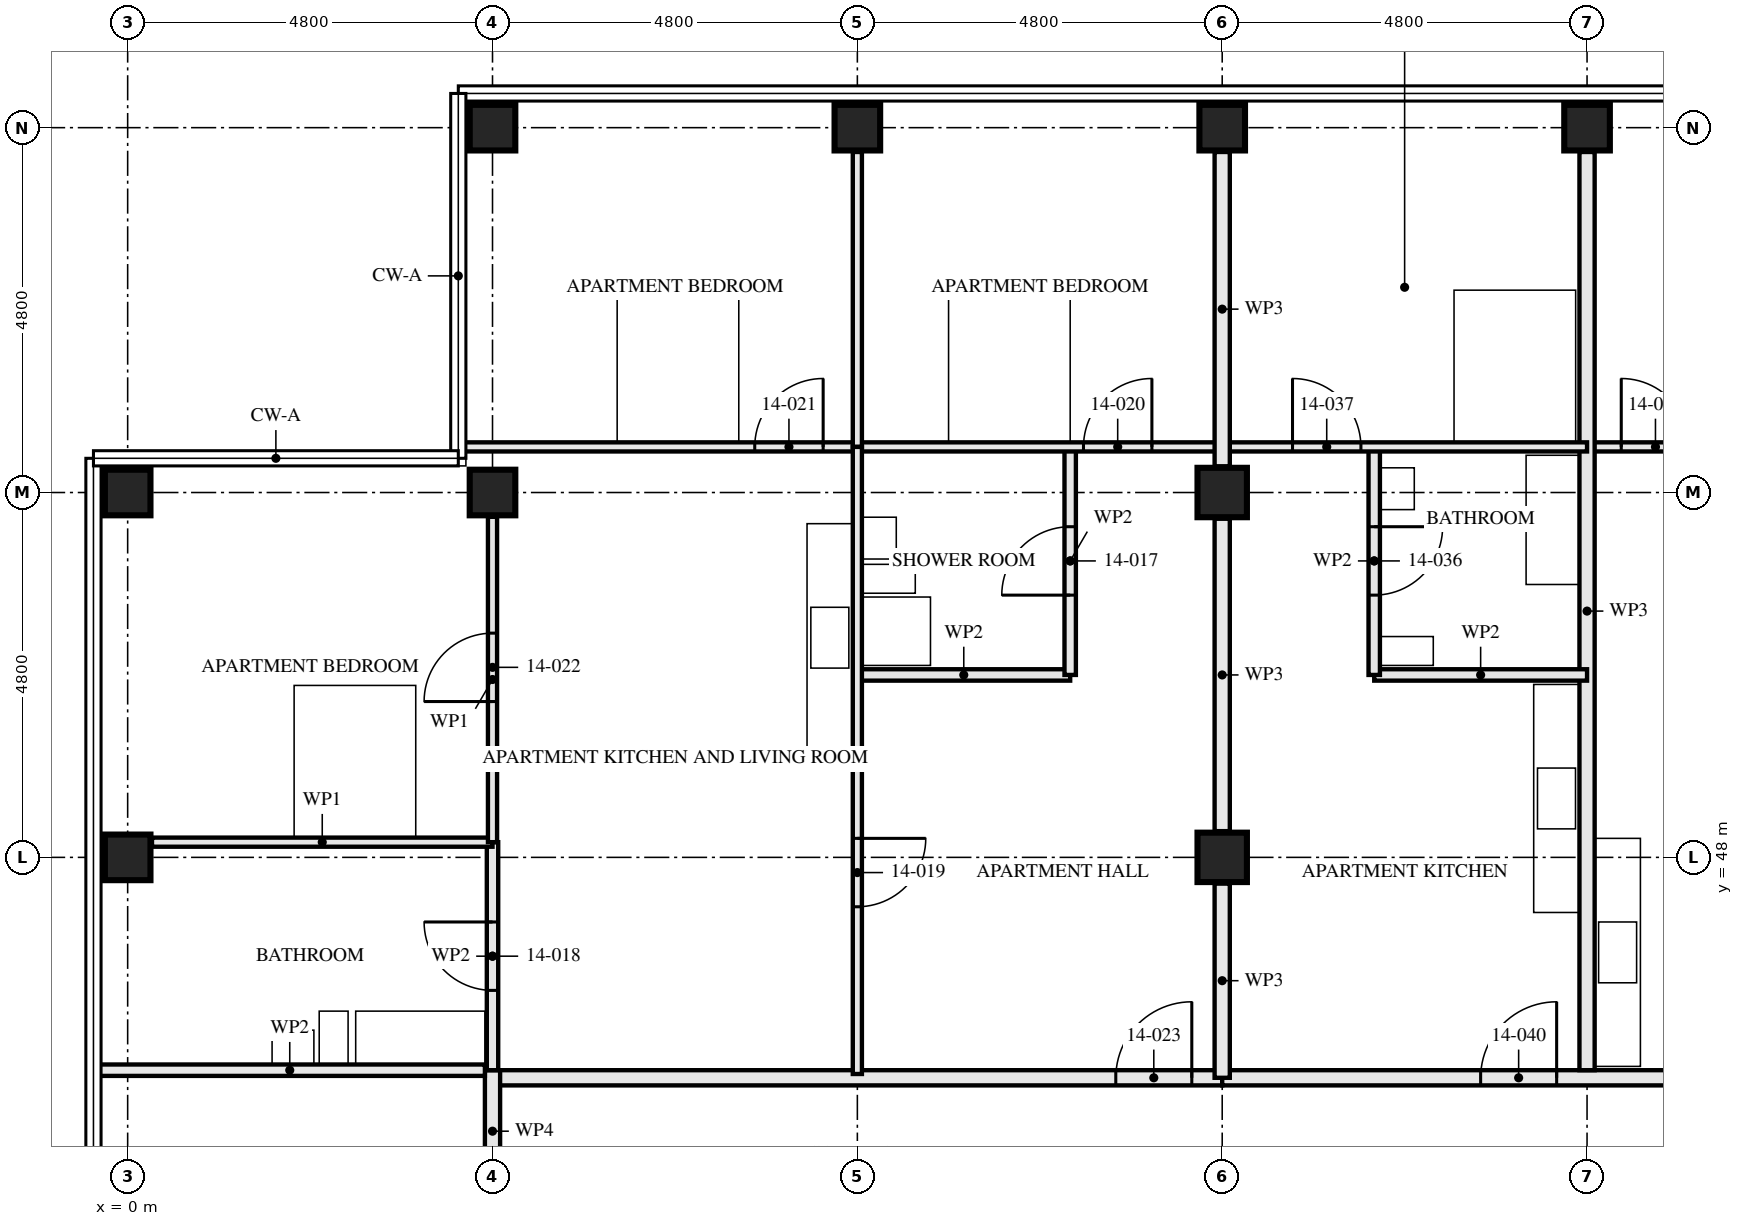
"""IFC4 building model, lengths in metres.
Left out: names, types, materials, properties, quantities, classifications, styles, units other than length and angle.
Written with IfcOpenShell. Run it as: python <this file> out.ifc"""

import sys

from ifc_helpers import new_model, si_unit, direction, frame, frame_2d, origin, origin_2d, place, context, subcontext, project, spatial, rectangle, hollow_rectangle, extrude, element, fill, save


model = new_model("IFC4")
c1 = context("Model", 3, precision=1e-05, world=origin(), true_north=direction((0.0, 1.0)))
c2 = subcontext(c1, "Body", "Model", "MODEL_VIEW")
j1 = project(units=[si_unit("LENGTHUNIT", "METRE"), si_unit("PLANEANGLEUNIT", "RADIAN")], contexts=[c1])
p1 = place(None, origin())
s1 = spatial("IfcSite", under=j1, at=p1, CompositionType="ELEMENT")
p2 = place(p1, origin())
s2 = spatial("IfcBuilding", under=s1, at=p2, CompositionType="ELEMENT")
p3 = place(p2, frame((0.0, 0.0, 55.0)))
s3 = spatial("IfcBuildingStorey", under=s2, at=p3, CompositionType="ELEMENT", Elevation=55.0)
p4 = place(p3, frame((0.0, 48.0, 0.0), z_axis=(0.0, 0.0, 1.0), x_axis=(1.0, 0.0, 0.0)))
e1 = element("IfcColumn", 1, at=p4, inside=s3, PredefinedType="COLUMN", context=c2, shape_type="SweptSolid", body=[
    extrude(hollow_rectangle(XDim=0.6, YDim=0.6, WallThickness=0.08, at=origin_2d()), origin(), (0.0, 0.0, 1.0), 3.5),
])
for number, where, z_axis, x_axis in (
    (2, (0.0, 52.8, 0.0), (0.0, 0.0, 1.0), (0.0, 1.0, 0.0)),
    (3, (4.8, 52.8, 0.0), (0.0, 0.0, 1.0), (0.0, 1.0, 0.0)),
    (4, (4.8, 57.6, 0.0), (0.0, 0.0, 1.0), (0.0, 1.0, 0.0)),
):
    element("IfcColumn", number, at=place(p3, frame(where, z_axis=z_axis, x_axis=x_axis)), inside=s3, PredefinedType="COLUMN", context=c2, shape_type="SweptSolid", body=[
        extrude(hollow_rectangle(XDim=0.6, YDim=0.6, WallThickness=0.06, at=origin_2d()), origin(), (0.0, 0.0, 1.0), 3.5),
    ])
p5 = place(p3, frame((9.6, 57.6, 0.0), z_axis=(0.0, 0.0, 1.0), x_axis=(0.0, 1.0, 0.0)))
e5 = element("IfcColumn", 5, at=p5, inside=s3, PredefinedType="COLUMN", context=c2, shape_type="SweptSolid", body=[
    extrude(hollow_rectangle(XDim=0.6, YDim=0.6, WallThickness=0.08, at=origin_2d()), origin(), (0.0, 0.0, 1.0), 3.5),
])
for number, where, z_axis, x_axis in (
    (6, (14.4, 48.0, 0.0), (0.0, 0.0, 1.0), (1.0, 0.0, 0.0)),
    (7, (14.4, 52.8, 0.0), (0.0, 0.0, 1.0), (1.0, 0.0, 0.0)),
):
    element("IfcColumn", number, at=place(p3, frame(where, z_axis=z_axis, x_axis=x_axis)), inside=s3, PredefinedType="COLUMN", context=c2, shape_type="SweptSolid", body=[
        extrude(hollow_rectangle(XDim=0.65, YDim=0.65, WallThickness=0.05, at=origin_2d()), origin(), (0.0, 0.0, 1.0), 3.5),
    ])
for number, where, z_axis, x_axis in (
    (8, (14.4, 57.6, 0.0), (0.0, 0.0, 1.0), (0.0, 1.0, 0.0)),
    (9, (19.2, 57.6, 0.0), (0.0, 0.0, 1.0), (0.0, 1.0, 0.0)),
):
    element("IfcColumn", number, at=place(p3, frame(where, z_axis=z_axis, x_axis=x_axis)), inside=s3, PredefinedType="COLUMN", context=c2, shape_type="SweptSolid", body=[
        extrude(hollow_rectangle(XDim=0.6, YDim=0.6, WallThickness=0.08, at=origin_2d()), origin(), (0.0, 0.0, 1.0), 3.5),
    ])
p6 = place(p3, frame((12.4, 53.4, 0.0), z_axis=(0.0, 0.0, 1.0), x_axis=(0.0, -1.0, 0.0)))
e10 = element("IfcWall", 10, at=p6, inside=s3, PredefinedType="PARTITIONING", context=c2, shape_type="SweptSolid", body=[
    extrude(rectangle(XDim=3.0, YDim=0.15, at=frame_2d((1.5, 0.0))), origin(), (0.0, 0.0, 1.0), 2.55),
])
p7 = place(p6, frame((1.05, 0.0, 0.0)))
e11 = element("IfcOpeningElement", 11, at=p7, cuts=e10, PredefinedType="OPENING", context=c2, shape_type="SweptSolid", body=[
    extrude(rectangle(XDim=0.9, YDim=2.1, at=frame_2d((0.45, 1.05))), frame((0.0, 0.085, 0.0), z_axis=(0.0, -1.0, 0.0), x_axis=(1.0, 0.0, 0.0)), (0.0, 0.0, 1.0), 0.171),
])
p8 = place(p3, frame((12.4, 50.4, 0.0), z_axis=(0.0, 0.0, 1.0), x_axis=(-1.0, 0.0, 0.0)))
e12 = element("IfcWall", 12, at=p8, inside=s3, PredefinedType="PARTITIONING", context=c2, shape_type="SweptSolid", body=[
    extrude(rectangle(XDim=2.8, YDim=0.15, at=frame_2d((1.4, 0.0))), origin(), (0.0, 0.0, 1.0), 3.33),
])
p9 = place(p3, frame((4.8, 48.2, 0.0), z_axis=(0.0, 0.0, 1.0), x_axis=(0.0, -1.0, 0.0)))
e13 = element("IfcWall", 13, at=p9, inside=s3, PredefinedType="PARTITIONING", context=c2, shape_type="SweptSolid", body=[
    extrude(rectangle(XDim=3.0, YDim=0.15, at=frame_2d((1.5, 0.0))), origin(), (0.0, 0.0, 1.0), 2.55),
])
p10 = place(p9, frame((1.05, 0.0, 0.0)))
e14 = element("IfcOpeningElement", 14, at=p10, cuts=e13, PredefinedType="OPENING", context=c2, shape_type="SweptSolid", body=[
    extrude(rectangle(XDim=0.9, YDim=2.1, at=frame_2d((0.45, 1.05))), frame((0.0, 0.085, 0.0), z_axis=(0.0, -1.0, 0.0), x_axis=(1.0, 0.0, 0.0)), (0.0, 0.0, 1.0), 0.171),
])
p11 = place(p3, frame((9.6, 53.4, 0.0), z_axis=(0.0, 0.0, 1.0), x_axis=(0.0, -1.0, 0.0)))
e15 = element("IfcWall", 15, at=p11, inside=s3, PredefinedType="PARTITIONING", context=c2, shape_type="SweptSolid", body=[
    extrude(rectangle(XDim=8.25, YDim=0.12, at=frame_2d((4.125, 0.0))), origin(), (0.0, 0.0, 1.0), 2.55),
])
p12 = place(p11, frame((5.15, 0.0, 0.0)))
e16 = element("IfcOpeningElement", 16, at=p12, cuts=e15, PredefinedType="OPENING", context=c2, shape_type="SweptSolid", body=[
    extrude(rectangle(XDim=0.9, YDim=2.1, at=frame_2d((0.45, 1.05))), frame((0.0, 0.071, 0.0), z_axis=(0.0, -1.0, 0.0), x_axis=(1.0, 0.0, 0.0)), (0.0, 0.0, 1.0), 0.141),
])
p13 = place(p3, frame((14.4, 53.4, 0.0), z_axis=(0.0, 0.0, 1.0), x_axis=(-1.0, 0.0, 0.0)))
e17 = element("IfcWall", 17, at=p13, inside=s3, PredefinedType="PARTITIONING", context=c2, shape_type="SweptSolid", body=[
    extrude(rectangle(XDim=4.8, YDim=0.12, at=frame_2d((2.4, 0.0))), origin(), (0.0, 0.0, 1.0), 3.33),
])
p14 = place(p13, frame((0.925, 0.0, 0.0)))
e18 = element("IfcOpeningElement", 18, at=p14, cuts=e17, PredefinedType="OPENING", context=c2, shape_type="SweptSolid", body=[
    extrude(rectangle(XDim=0.9, YDim=2.1, at=frame_2d((0.45, 1.05))), frame((0.0, 0.071, 0.0), z_axis=(0.0, -1.0, 0.0), x_axis=(1.0, 0.0, 0.0)), (0.0, 0.0, 1.0), 0.141),
])
p15 = place(p3, frame((9.6, 53.4, 0.0), z_axis=(0.0, 0.0, 1.0), x_axis=(-1.0, 0.0, 0.0)))
e19 = element("IfcWall", 19, at=p15, inside=s3, PredefinedType="PARTITIONING", context=c2, shape_type="SweptSolid", body=[
    extrude(rectangle(XDim=5.235, YDim=0.12, at=frame_2d((2.618, 0.0))), origin(), (0.0, 0.0, 1.0), 2.32),
])
p16 = place(p15, frame((0.45, 0.0, 0.0)))
e20 = element("IfcOpeningElement", 20, at=p16, cuts=e19, PredefinedType="OPENING", context=c2, shape_type="SweptSolid", body=[
    extrude(rectangle(XDim=0.9, YDim=2.1, at=frame_2d((0.45, 1.05))), frame((0.0, 0.071, 0.0), z_axis=(0.0, -1.0, 0.0), x_axis=(1.0, 0.0, 0.0)), (0.0, 0.0, 1.0), 0.141),
])
p17 = place(p3, frame((4.8, 48.2, 0.0), z_axis=(0.0, 0.0, 1.0), x_axis=(-1.0, 0.0, 0.0)))
e21 = element("IfcWall", 21, at=p17, inside=s3, PredefinedType="PARTITIONING", context=c2, shape_type="SweptSolid", body=[
    extrude(rectangle(XDim=4.48, YDim=0.12, at=frame_2d((2.24, 0.0))), origin(), (0.0, 0.0, 1.0), 3.33),
])
p18 = place(p3, frame((9.6, 57.28, 0.0), z_axis=(0.0, 0.0, 1.0), x_axis=(0.0, -1.0, 0.0)))
e22 = element("IfcWall", 22, at=p18, inside=s3, PredefinedType="PARTITIONING", context=c2, shape_type="SweptSolid", body=[
    extrude(rectangle(XDim=3.88, YDim=0.12, at=frame_2d((1.94, 0.0))), origin(), (0.0, 0.0, 1.0), 3.33),
])
p19 = place(p3, frame((4.8, 52.48, 0.0), z_axis=(0.0, 0.0, 1.0), x_axis=(0.0, -1.0, 0.0)))
e23 = element("IfcWall", 23, at=p19, inside=s3, PredefinedType="PARTITIONING", context=c2, shape_type="SweptSolid", body=[
    extrude(rectangle(XDim=4.28, YDim=0.12, at=frame_2d((2.14, 0.0))), origin(), (0.0, 0.0, 1.0), 3.33),
])
p20 = place(p19, frame((1.53, 0.0, 0.0)))
e24 = element("IfcOpeningElement", 24, at=p20, cuts=e23, PredefinedType="OPENING", context=c2, shape_type="SweptSolid", body=[
    extrude(rectangle(XDim=0.9, YDim=2.1, at=frame_2d((0.45, 1.05))), frame((0.0, 0.071, 0.0), z_axis=(0.0, -1.0, 0.0), x_axis=(1.0, 0.0, 0.0)), (0.0, 0.0, 1.0), 0.141),
])
p21 = place(p3, frame((14.4, 45.1, 0.0), z_axis=(0.0, 0.0, 1.0), x_axis=(-1.0, 0.0, 0.0)))
e25 = element("IfcWall", 25, at=p21, inside=s3, PredefinedType="PARTITIONING", context=c2, shape_type="SweptSolid", body=[
    extrude(rectangle(XDim=9.6, YDim=0.2, at=frame_2d((4.8, 0.0))), origin(), (0.0, 0.0, 1.0), 3.33),
])
p22 = place(p21, frame((0.4, 0.0, 0.0)))
e26 = element("IfcOpeningElement", 26, at=p22, cuts=e25, PredefinedType="OPENING", context=c2, shape_type="SweptSolid", body=[
    extrude(rectangle(XDim=1.0, YDim=2.1, at=frame_2d((0.5, 1.05))), frame((0.0, 0.111, 0.0), z_axis=(0.0, -1.0, 0.0), x_axis=(1.0, 0.0, 0.0)), (0.0, 0.0, 1.0), 0.221),
])
p23 = place(p3, frame((4.8, 45.2, 0.0), z_axis=(0.0, 0.0, 1.0), x_axis=(0.0, -1.0, 0.0)))
e27 = element("IfcWall", 27, at=p23, inside=s3, PredefinedType="PARTITIONING", context=c2, shape_type="SweptSolid", body=[
    extrude(rectangle(XDim=1.605, YDim=0.2, at=frame_2d((0.802, 0.0))), origin(), (0.0, 0.0, 1.0), 3.33),
])
p24 = place(p3, frame((24.0, 53.4, 0.0), z_axis=(0.0, 0.0, 1.0), x_axis=(-1.0, 0.0, 0.0)))
e28 = element("IfcWall", 28, at=p24, inside=s3, PredefinedType="PARTITIONING", context=c2, shape_type="SweptSolid", body=[
    extrude(rectangle(XDim=4.8, YDim=0.12, at=frame_2d((2.4, 0.0))), origin(), (0.0, 0.0, 1.0), 3.33),
])
p25 = place(p24, frame((3.45, 0.0, 0.0)))
e29 = element("IfcOpeningElement", 29, at=p25, cuts=e28, PredefinedType="OPENING", context=c2, shape_type="SweptSolid", body=[
    extrude(rectangle(XDim=0.9, YDim=2.1, at=frame_2d((0.45, 1.05))), frame((0.0, 0.071, 0.0), z_axis=(0.0, -1.0, 0.0), x_axis=(1.0, 0.0, 0.0)), (0.0, 0.0, 1.0), 0.141),
])
p26 = place(p3, frame((19.2, 57.28, 0.0), z_axis=(0.0, 0.0, 1.0), x_axis=(0.0, -1.0, 0.0)))
e30 = element("IfcWall", 30, at=p26, inside=s3, PredefinedType="PARTITIONING", context=c2, shape_type="SweptSolid", body=[
    extrude(rectangle(XDim=12.08, YDim=0.2, at=frame_2d((6.04, 0.0))), origin(), (0.0, 0.0, 1.0), 2.55),
])
p27 = place(p3, frame((16.4, 53.4, 0.0), z_axis=(0.0, 0.0, 1.0), x_axis=(0.0, -1.0, 0.0)))
e31 = element("IfcWall", 31, at=p27, inside=s3, PredefinedType="PARTITIONING", context=c2, shape_type="SweptSolid", body=[
    extrude(rectangle(XDim=3.0, YDim=0.15, at=frame_2d((1.5, 0.0))), origin(), (0.0, 0.0, 1.0), 2.55),
])
p28 = place(p27, frame((1.05, 0.0, 0.0)))
e32 = element("IfcOpeningElement", 32, at=p28, cuts=e31, PredefinedType="OPENING", context=c2, shape_type="SweptSolid", body=[
    extrude(rectangle(XDim=0.9, YDim=2.1, at=frame_2d((0.45, 1.05))), frame((0.0, 0.085, 0.0), z_axis=(0.0, -1.0, 0.0), x_axis=(1.0, 0.0, 0.0)), (0.0, 0.0, 1.0), 0.171),
])
p29 = place(p3, frame((19.2, 50.4, 0.0), z_axis=(0.0, 0.0, 1.0), x_axis=(-1.0, 0.0, 0.0)))
e33 = element("IfcWall", 33, at=p29, inside=s3, PredefinedType="PARTITIONING", context=c2, shape_type="SweptSolid", body=[
    extrude(rectangle(XDim=2.8, YDim=0.15, at=frame_2d((1.4, 0.0))), origin(), (0.0, 0.0, 1.0), 3.33),
])
p30 = place(p3, frame((19.2, 53.4, 0.0), z_axis=(0.0, 0.0, 1.0), x_axis=(-1.0, 0.0, 0.0)))
e34 = element("IfcWall", 34, at=p30, inside=s3, PredefinedType="PARTITIONING", context=c2, shape_type="SweptSolid", body=[
    extrude(rectangle(XDim=4.8, YDim=0.12, at=frame_2d((2.4, 0.0))), origin(), (0.0, 0.0, 1.0), 3.33),
])
p31 = place(p30, frame((2.975, 0.0, 0.0)))
e35 = element("IfcOpeningElement", 35, at=p31, cuts=e34, PredefinedType="OPENING", context=c2, shape_type="SweptSolid", body=[
    extrude(rectangle(XDim=0.9, YDim=2.1, at=frame_2d((0.45, 1.05))), frame((0.0, 0.071, 0.0), z_axis=(0.0, -1.0, 0.0), x_axis=(1.0, 0.0, 0.0)), (0.0, 0.0, 1.0), 0.141),
])
p32 = place(p3, frame((28.8, 45.1, 0.0), z_axis=(0.0, 0.0, 1.0), x_axis=(-1.0, 0.0, 0.0)))
e36 = element("IfcWall", 36, at=p32, inside=s3, PredefinedType="PARTITIONING", context=c2, shape_type="SweptSolid", body=[
    extrude(rectangle(XDim=14.4, YDim=0.2, at=frame_2d((7.2, 0.0))), origin(), (0.0, 0.0, 1.0), 3.33),
])
p33 = place(p32, frame((0.4, 0.0, 0.0)))
e37 = element("IfcOpeningElement", 37, at=p33, cuts=e36, PredefinedType="OPENING", context=c2, shape_type="SweptSolid", body=[
    extrude(rectangle(XDim=1.0, YDim=2.1, at=frame_2d((0.5, 1.05))), frame((0.0, 0.111, 0.0), z_axis=(0.0, -1.0, 0.0), x_axis=(1.0, 0.0, 0.0)), (0.0, 0.0, 1.0), 0.221),
])
p34 = place(p32, frame((5.2, 0.0, 0.0)))
e38 = element("IfcOpeningElement", 38, at=p34, cuts=e36, PredefinedType="OPENING", context=c2, shape_type="SweptSolid", body=[
    extrude(rectangle(XDim=1.0, YDim=2.1, at=frame_2d((0.5, 1.05))), frame((0.0, 0.111, 0.0), z_axis=(0.0, -1.0, 0.0), x_axis=(1.0, 0.0, 0.0)), (0.0, 0.0, 1.0), 0.221),
])
p35 = place(p32, frame((10.0, 0.0, 0.0)))
e39 = element("IfcOpeningElement", 39, at=p35, cuts=e36, PredefinedType="OPENING", context=c2, shape_type="SweptSolid", body=[
    extrude(rectangle(XDim=1.0, YDim=2.1, at=frame_2d((0.5, 1.05))), frame((0.0, 0.111, 0.0), z_axis=(0.0, -1.0, 0.0), x_axis=(1.0, 0.0, 0.0)), (0.0, 0.0, 1.0), 0.221),
])
p36 = place(p3, frame((14.4, 45.1, 0.0), z_axis=(0.0, 0.0, 1.0), x_axis=(0.0, 1.0, 0.0)))
e40 = element("IfcWall", 40, at=p36, inside=s3, PredefinedType="PARTITIONING", context=c2, shape_type="SweptSolid", body=[
    extrude(rectangle(XDim=2.555, YDim=0.2, at=frame_2d((1.277, 0.0))), origin(), (0.0, 0.0, 1.0), 2.32),
])
p37 = place(p3, frame((14.4, 48.345, 0.0), z_axis=(0.0, 0.0, 1.0), x_axis=(0.0, 1.0, 0.0)))
e41 = element("IfcWall", 41, at=p37, inside=s3, PredefinedType="PARTITIONING", context=c2, shape_type="SweptSolid", body=[
    extrude(rectangle(XDim=4.11, YDim=0.2, at=frame_2d((2.055, 0.0))), origin(), (0.0, 0.0, 1.0), 2.32),
])
p38 = place(p3, frame((14.4, 53.145, 0.0), z_axis=(0.0, 0.0, 1.0), x_axis=(0.0, 1.0, 0.0)))
e42 = element("IfcWall", 42, at=p38, inside=s3, PredefinedType="PARTITIONING", context=c2, shape_type="SweptSolid", body=[
    extrude(rectangle(XDim=4.135, YDim=0.2, at=frame_2d((2.067, 0.0))), origin(), (0.0, 0.0, 1.0), 2.32),
])
p39 = place(p3, frame((4.7, 45.2, 0.0), z_axis=(0.0, 0.0, 1.0), x_axis=(-1.0, 0.0, 0.0)))
e43 = element("IfcWall", 43, at=p39, inside=s3, PredefinedType="PARTITIONING", context=c2, shape_type="SweptSolid", body=[
    extrude(rectangle(XDim=5.135, YDim=0.15, at=frame_2d((2.567, 0.0))), origin(), (0.0, 0.0, 1.0), 2.32),
])
p40 = place(p7, frame((0.9, 0.0, 0.0), z_axis=(0.0, 0.0, 1.0), x_axis=(-1.0, 0.0, 0.0)))
e44 = element("IfcDoor", 44, at=p40, inside=s3, OperationType="SINGLE_SWING_RIGHT", PredefinedType="DOOR", context=c2, shape_type="SweptSolid", body=[
    extrude(rectangle(XDim=0.9, YDim=2.1, at=frame_2d((0.45, 1.05))), frame((0.0, 0.022, 0.0), z_axis=(0.0, -1.0, 0.0), x_axis=(1.0, 0.0, 0.0)), (0.0, 0.0, 1.0), 0.044),
])
fill(e11, e44)
p41 = place(p10, frame((0.9, 0.0, 0.0), z_axis=(0.0, 0.0, 1.0), x_axis=(-1.0, 0.0, 0.0)))
e45 = element("IfcDoor", 45, at=p41, inside=s3, OperationType="SINGLE_SWING_LEFT", PredefinedType="DOOR", context=c2, shape_type="SweptSolid", body=[
    extrude(rectangle(XDim=0.9, YDim=2.1, at=frame_2d((0.45, 1.05))), frame((0.0, 0.022, 0.0), z_axis=(0.0, -1.0, 0.0), x_axis=(1.0, 0.0, 0.0)), (0.0, 0.0, 1.0), 0.044),
])
fill(e14, e45)
p42 = place(p12, origin())
e46 = element("IfcDoor", 46, at=p42, inside=s3, OperationType="SINGLE_SWING_RIGHT", PredefinedType="DOOR", context=c2, shape_type="SweptSolid", body=[
    extrude(rectangle(XDim=0.9, YDim=2.1, at=frame_2d((0.45, 1.05))), frame((0.0, 0.022, 0.0), z_axis=(0.0, -1.0, 0.0), x_axis=(1.0, 0.0, 0.0)), (0.0, 0.0, 1.0), 0.044),
])
fill(e16, e46)
p43 = place(p14, frame((0.9, 0.0, 0.0), z_axis=(0.0, 0.0, 1.0), x_axis=(-1.0, 0.0, 0.0)))
e47 = element("IfcDoor", 47, at=p43, inside=s3, OperationType="SINGLE_SWING_LEFT", PredefinedType="DOOR", context=c2, shape_type="SweptSolid", body=[
    extrude(rectangle(XDim=0.9, YDim=2.1, at=frame_2d((0.45, 1.05))), frame((0.0, 0.022, 0.0), z_axis=(0.0, -1.0, 0.0), x_axis=(1.0, 0.0, 0.0)), (0.0, 0.0, 1.0), 0.044),
])
fill(e18, e47)
p44 = place(p16, frame((0.9, 0.0, 0.0), z_axis=(0.0, 0.0, 1.0), x_axis=(-1.0, 0.0, 0.0)))
e48 = element("IfcDoor", 48, at=p44, inside=s3, OperationType="SINGLE_SWING_LEFT", PredefinedType="DOOR", context=c2, shape_type="SweptSolid", body=[
    extrude(rectangle(XDim=0.9, YDim=2.1, at=frame_2d((0.45, 1.05))), frame((0.0, 0.022, 0.0), z_axis=(0.0, -1.0, 0.0), x_axis=(1.0, 0.0, 0.0)), (0.0, 0.0, 1.0), 0.044),
])
fill(e20, e48)
p45 = place(p20, frame((0.9, 0.0, 0.0), z_axis=(0.0, 0.0, 1.0), x_axis=(-1.0, 0.0, 0.0)))
e49 = element("IfcDoor", 49, at=p45, inside=s3, OperationType="SINGLE_SWING_RIGHT", PredefinedType="DOOR", context=c2, shape_type="SweptSolid", body=[
    extrude(rectangle(XDim=0.9, YDim=2.1, at=frame_2d((0.45, 1.05))), frame((0.0, 0.022, 0.0), z_axis=(0.0, -1.0, 0.0), x_axis=(1.0, 0.0, 0.0)), (0.0, 0.0, 1.0), 0.044),
])
fill(e24, e49)
p46 = place(p22, frame((1.0, 0.0, 0.0), z_axis=(0.0, 0.0, 1.0), x_axis=(-1.0, 0.0, 0.0)))
e50 = element("IfcDoor", 50, at=p46, inside=s3, OperationType="SINGLE_SWING_LEFT", PredefinedType="DOOR", context=c2, shape_type="SweptSolid", body=[
    extrude(rectangle(XDim=1.0, YDim=2.1, at=frame_2d((0.5, 1.05))), frame((0.0, 0.027, 0.0), z_axis=(0.0, -1.0, 0.0), x_axis=(1.0, 0.0, 0.0)), (0.0, 0.0, 1.0), 0.054),
])
fill(e26, e50)
p47 = place(p25, frame((0.9, 0.0, 0.0), z_axis=(0.0, 0.0, 1.0), x_axis=(-1.0, 0.0, 0.0)))
e51 = element("IfcDoor", 51, at=p47, inside=s3, OperationType="SINGLE_SWING_RIGHT", PredefinedType="DOOR", context=c2, shape_type="SweptSolid", body=[
    extrude(rectangle(XDim=0.9, YDim=2.1, at=frame_2d((0.45, 1.05))), frame((0.0, 0.022, 0.0), z_axis=(0.0, -1.0, 0.0), x_axis=(1.0, 0.0, 0.0)), (0.0, 0.0, 1.0), 0.044),
])
fill(e29, e51)
p48 = place(p28, origin())
e52 = element("IfcDoor", 52, at=p48, inside=s3, OperationType="SINGLE_SWING_RIGHT", PredefinedType="DOOR", context=c2, shape_type="SweptSolid", body=[
    extrude(rectangle(XDim=0.9, YDim=2.1, at=frame_2d((0.45, 1.05))), frame((0.0, 0.022, 0.0), z_axis=(0.0, -1.0, 0.0), x_axis=(1.0, 0.0, 0.0)), (0.0, 0.0, 1.0), 0.044),
])
fill(e32, e52)
p49 = place(p31, frame((0.9, 0.0, 0.0), z_axis=(0.0, 0.0, 1.0), x_axis=(-1.0, 0.0, 0.0)))
e53 = element("IfcDoor", 53, at=p49, inside=s3, OperationType="SINGLE_SWING_RIGHT", PredefinedType="DOOR", context=c2, shape_type="SweptSolid", body=[
    extrude(rectangle(XDim=0.9, YDim=2.1, at=frame_2d((0.45, 1.05))), frame((0.0, 0.022, 0.0), z_axis=(0.0, -1.0, 0.0), x_axis=(1.0, 0.0, 0.0)), (0.0, 0.0, 1.0), 0.044),
])
fill(e35, e53)
p50 = place(p35, frame((1.0, 0.0, 0.0), z_axis=(0.0, 0.0, 1.0), x_axis=(-1.0, 0.0, 0.0)))
e54 = element("IfcDoor", 54, at=p50, inside=s3, OperationType="SINGLE_SWING_LEFT", PredefinedType="DOOR", context=c2, shape_type="SweptSolid", body=[
    extrude(rectangle(XDim=1.0, YDim=2.1, at=frame_2d((0.5, 1.05))), frame((0.0, 0.027, 0.0), z_axis=(0.0, -1.0, 0.0), x_axis=(1.0, 0.0, 0.0)), (0.0, 0.0, 1.0), 0.054),
])
fill(e39, e54)
save(model, sys.argv[1])
